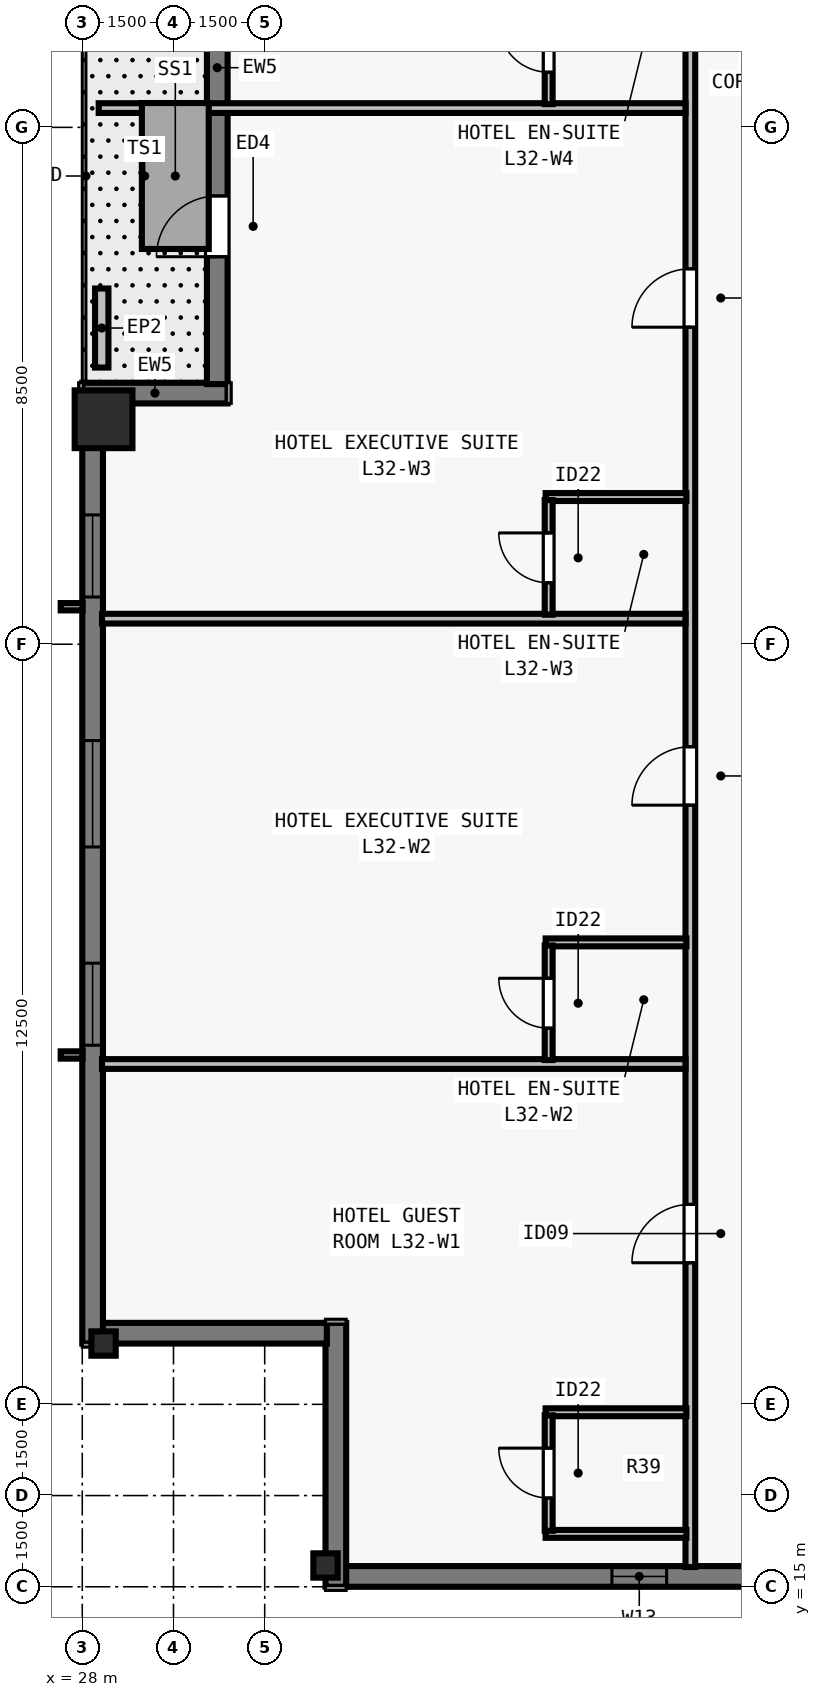
"""IFC4 building model, lengths in metres.
Left out: names, types, materials, properties, quantities, classifications, styles, units other than length and angle.
Written with IfcOpenShell. Run it as: python <this file> out.ifc"""

import sys

from ifc_helpers import new_model, si_unit, direction, frame, frame_2d, origin, origin_2d, place, context, subcontext, project, spatial, rectangle, i_section, extrude, element, fill, save


model = new_model("IFC4")
c1 = context("Model", 3, precision=1e-05, world=origin(), true_north=direction((0.0, 1.0)))
c2 = subcontext(c1, "Body", "Model", "MODEL_VIEW")
j1 = project(units=[si_unit("LENGTHUNIT", "METRE"), si_unit("PLANEANGLEUNIT", "RADIAN")], contexts=[c1])
p1 = place(None, origin())
s1 = spatial("IfcSite", under=j1, at=p1, CompositionType="ELEMENT")
p2 = place(p1, origin())
s2 = spatial("IfcBuilding", under=s1, at=p2, CompositionType="ELEMENT")
p3 = place(p2, frame((0.0, 0.0, 120.0)))
s3 = spatial("IfcBuildingStorey", under=s2, at=p3, CompositionType="ELEMENT", Elevation=120.0)
p4 = place(p3, frame((32.0, 15.35, 0.0), z_axis=(0.0, 0.0, 1.0), x_axis=(1.0, 0.0, 0.0)))
e1 = element("IfcColumn", 1, at=p4, inside=s3, PredefinedType="COLUMN", context=c2, shape_type="SweptSolid", body=[
    extrude(i_section(OverallWidth=0.4, OverallDepth=0.4, WebThickness=0.022, FlangeThickness=0.036, at=origin_2d()), origin(), (0.0, 0.0, 1.0), 3.5),
])
p5 = place(p3, frame((28.35, 34.2, 0.0), z_axis=(0.0, 0.0, 1.0), x_axis=(0.0, 1.0, 0.0)))
e2 = element("IfcColumn", 2, at=p5, inside=s3, PredefinedType="COLUMN", context=c2, shape_type="SweptSolid", body=[
    extrude(rectangle(XDim=0.95, YDim=0.95, at=origin_2d()), origin(), (0.0, 0.0, 1.0), 3.5),
])
p6 = place(p3, frame((28.35, 19.0, 0.0), z_axis=(0.0, 0.0, 1.0), x_axis=(0.0, 1.0, 0.0)))
e3 = element("IfcColumn", 3, at=p6, inside=s3, PredefinedType="COLUMN", context=c2, shape_type="SweptSolid", body=[
    extrude(i_section(OverallWidth=0.4, OverallDepth=0.4, WebThickness=0.022, FlangeThickness=0.036, at=origin_2d()), origin(), (0.0, 0.0, 1.0), 3.5),
])
p7 = place(p3, frame((72.0, 15.17, 0.0), z_axis=(0.0, 0.0, 1.0), x_axis=(-1.0, 0.0, 0.0)))
e4 = element("IfcWall", 4, at=p7, inside=s3, PredefinedType="SOLIDWALL", context=c2, shape_type="SweptSolid", body=[
    extrude(rectangle(XDim=39.682, YDim=0.34, at=frame_2d((19.841, 0.0))), origin(), (0.0, 0.0, 1.0), 3.28),
])
p8 = place(p7, frame((5.802, 0.0, 0.8)))
e5 = element("IfcOpeningElement", 5, at=p8, cuts=e4, PredefinedType="OPENING", context=c2, shape_type="SweptSolid", body=[
    extrude(rectangle(XDim=1.35, YDim=1.66, at=frame_2d((0.675, 0.83))), frame((0.0, 0.18, 0.0), z_axis=(0.0, -1.0, 0.0), x_axis=(1.0, 0.0, 0.0)), (0.0, 0.0, 1.0), 0.36),
])
p9 = place(p7, frame((12.059, 0.0, 0.8)))
e6 = element("IfcOpeningElement", 6, at=p9, cuts=e4, PredefinedType="OPENING", context=c2, shape_type="SweptSolid", body=[
    extrude(rectangle(XDim=1.35, YDim=1.66, at=frame_2d((0.675, 0.83))), frame((0.0, 0.18, 0.0), z_axis=(0.0, -1.0, 0.0), x_axis=(1.0, 0.0, 0.0)), (0.0, 0.0, 1.0), 0.36),
])
p10 = place(p7, frame((19.166, 0.0, 0.8)))
e7 = element("IfcOpeningElement", 7, at=p10, cuts=e4, PredefinedType="OPENING", context=c2, shape_type="SweptSolid", body=[
    extrude(rectangle(XDim=1.35, YDim=1.66, at=frame_2d((0.675, 0.83))), frame((0.0, 0.18, 0.0), z_axis=(0.0, -1.0, 0.0), x_axis=(1.0, 0.0, 0.0)), (0.0, 0.0, 1.0), 0.36),
])
p11 = place(p7, frame((21.27, 0.0, 0.8)))
e8 = element("IfcOpeningElement", 8, at=p11, cuts=e4, PredefinedType="OPENING", context=c2, shape_type="SweptSolid", body=[
    extrude(rectangle(XDim=1.75, YDim=1.66, at=frame_2d((0.875, 0.83))), frame((0.0, 0.18, 0.0), z_axis=(0.0, -1.0, 0.0), x_axis=(1.0, 0.0, 0.0)), (0.0, 0.0, 1.0), 0.36),
])
p12 = place(p7, frame((27.523, 0.0, 0.8)))
e9 = element("IfcOpeningElement", 9, at=p12, cuts=e4, PredefinedType="OPENING", context=c2, shape_type="SweptSolid", body=[
    extrude(rectangle(XDim=1.35, YDim=1.66, at=frame_2d((0.675, 0.83))), frame((0.0, 0.18, 0.0), z_axis=(0.0, -1.0, 0.0), x_axis=(1.0, 0.0, 0.0)), (0.0, 0.0, 1.0), 0.36),
])
p13 = place(p7, frame((29.627, 0.0, 0.8)))
e10 = element("IfcOpeningElement", 10, at=p13, cuts=e4, PredefinedType="OPENING", context=c2, shape_type="SweptSolid", body=[
    extrude(rectangle(XDim=1.75, YDim=1.66, at=frame_2d((0.875, 0.83))), frame((0.0, 0.18, 0.0), z_axis=(0.0, -1.0, 0.0), x_axis=(1.0, 0.0, 0.0)), (0.0, 0.0, 1.0), 0.36),
])
p14 = place(p7, frame((25.43, 0.0, 0.8)))
e11 = element("IfcOpeningElement", 11, at=p14, cuts=e4, PredefinedType="OPENING", context=c2, shape_type="SweptSolid", body=[
    extrude(rectangle(XDim=0.9, YDim=1.66, at=frame_2d((0.45, 0.83))), frame((0.0, 0.18, 0.0), z_axis=(0.0, -1.0, 0.0), x_axis=(1.0, 0.0, 0.0)), (0.0, 0.0, 1.0), 0.36),
])
p15 = place(p7, frame((15.83, 0.0, 0.8)))
e12 = element("IfcOpeningElement", 12, at=p15, cuts=e4, PredefinedType="OPENING", context=c2, shape_type="SweptSolid", body=[
    extrude(rectangle(XDim=0.9, YDim=1.66, at=frame_2d((0.45, 0.83))), frame((0.0, 0.18, 0.0), z_axis=(0.0, -1.0, 0.0), x_axis=(1.0, 0.0, 0.0)), (0.0, 0.0, 1.0), 0.36),
])
p16 = place(p7, frame((34.39, 0.0, 0.8)))
e13 = element("IfcOpeningElement", 13, at=p16, cuts=e4, PredefinedType="OPENING", context=c2, shape_type="SweptSolid", body=[
    extrude(rectangle(XDim=0.9, YDim=1.66, at=frame_2d((0.45, 0.83))), frame((0.0, 0.18, 0.0), z_axis=(0.0, -1.0, 0.0), x_axis=(1.0, 0.0, 0.0)), (0.0, 0.0, 1.0), 0.36),
])
p17 = place(p3, frame((32.17, 15.0, 0.0), z_axis=(0.0, 0.0, 1.0), x_axis=(0.0, 1.0, 0.0)))
e14 = element("IfcWall", 14, at=p17, inside=s3, PredefinedType="SOLIDWALL", context=c2, shape_type="SweptSolid", body=[
    extrude(rectangle(XDim=4.34, YDim=0.34, at=frame_2d((2.17, 0.0))), origin(), (0.0, 0.0, 1.0), 3.28),
])
p18 = place(p3, frame((32.022, 19.17, 0.0), z_axis=(0.0, 0.0, 1.0), x_axis=(-1.0, 0.0, 0.0)))
e15 = element("IfcWall", 15, at=p18, inside=s3, PredefinedType="SOLIDWALL", context=c2, shape_type="SweptSolid", body=[
    extrude(rectangle(XDim=3.704, YDim=0.34, at=frame_2d((1.852, 0.0))), origin(), (0.0, 0.0, 1.0), 3.28),
])
p19 = place(p3, frame((28.17, 19.0, 0.0), z_axis=(0.0, 0.0, 1.0), x_axis=(0.0, 1.0, 0.0)))
e16 = element("IfcWall", 16, at=p19, inside=s3, PredefinedType="SOLIDWALL", context=c2, shape_type="SweptSolid", body=[
    extrude(rectangle(XDim=15.482, YDim=0.34, at=frame_2d((7.741, 0.0))), origin(), (0.0, 0.0, 1.0), 3.28),
])
p20 = place(p19, frame((4.905, 0.0, 0.8)))
e17 = element("IfcOpeningElement", 17, at=p20, cuts=e16, PredefinedType="OPENING", context=c2, shape_type="SweptSolid", body=[
    extrude(rectangle(XDim=1.35, YDim=1.66, at=frame_2d((0.675, 0.83))), frame((0.0, 0.18, 0.0), z_axis=(0.0, -1.0, 0.0), x_axis=(1.0, 0.0, 0.0)), (0.0, 0.0, 1.0), 0.36),
])
p21 = place(p19, frame((8.166, 0.0, 0.8)))
e18 = element("IfcOpeningElement", 18, at=p21, cuts=e16, PredefinedType="OPENING", context=c2, shape_type="SweptSolid", body=[
    extrude(rectangle(XDim=1.75, YDim=1.66, at=frame_2d((0.875, 0.83))), frame((0.0, 0.18, 0.0), z_axis=(0.0, -1.0, 0.0), x_axis=(1.0, 0.0, 0.0)), (0.0, 0.0, 1.0), 0.36),
])
p22 = place(p19, frame((12.277, 0.0, 0.8)))
e19 = element("IfcOpeningElement", 19, at=p22, cuts=e16, PredefinedType="OPENING", context=c2, shape_type="SweptSolid", body=[
    extrude(rectangle(XDim=1.35, YDim=1.66, at=frame_2d((0.675, 0.83))), frame((0.0, 0.18, 0.0), z_axis=(0.0, -1.0, 0.0), x_axis=(1.0, 0.0, 0.0)), (0.0, 0.0, 1.0), 0.36),
])
p23 = place(p3, frame((28.0, 34.63, 0.0), z_axis=(0.0, 0.0, 1.0), x_axis=(1.0, 0.0, 0.0)))
e20 = element("IfcWall", 20, at=p23, inside=s3, PredefinedType="SOLIDWALL", context=c2, shape_type="SweptSolid", body=[
    extrude(rectangle(XDim=2.39, YDim=0.34, at=frame_2d((1.195, 0.0))), origin(), (0.0, 0.0, 1.0), 3.28),
])
p24 = place(p3, frame((30.22, 34.778, 0.0), z_axis=(0.0, 0.0, 1.0), x_axis=(0.0, 1.0, 0.0)))
e21 = element("IfcWall", 21, at=p24, inside=s3, PredefinedType="SOLIDWALL", context=c2, shape_type="SweptSolid", body=[
    extrude(rectangle(XDim=7.162, YDim=0.34, at=frame_2d((3.581, 0.0))), origin(), (0.0, 0.0, 1.0), 3.28),
])
p25 = place(p24, frame((2.094, 0.0, 0.0)))
e22 = element("IfcOpeningElement", 22, at=p25, cuts=e21, PredefinedType="OPENING", context=c2, shape_type="SweptSolid", body=[
    extrude(rectangle(XDim=1.0, YDim=2.15, at=frame_2d((0.5, 1.075))), frame((0.0, 0.18, 0.0), z_axis=(0.0, -1.0, 0.0), x_axis=(1.0, 0.0, 0.0)), (0.0, 0.0, 1.0), 0.36),
])
p26 = place(p3, frame((28.32, 35.05, 0.0), z_axis=(0.0, 0.0, 1.0), x_axis=(0.0, 1.0, 0.0)))
e23 = element("IfcWall", 23, at=p26, inside=s3, PredefinedType="PARAPET", context=c2, shape_type="SweptSolid", body=[
    extrude(rectangle(XDim=1.3, YDim=0.22, at=frame_2d((0.65, 0.0))), origin(), (0.0, 0.0, 1.0), 0.55),
])
p27 = place(p3, frame((38.0, 15.325, 0.0), z_axis=(0.0, 0.0, 1.0), x_axis=(0.0, 1.0, 0.0)))
e24 = element("IfcWall", 24, at=p27, inside=s3, PredefinedType="PARTITIONING", context=c2, shape_type="SweptSolid", body=[
    extrude(rectangle(XDim=47.35, YDim=0.16, at=frame_2d((23.675, 0.0))), origin(), (0.0, 0.0, 1.0), 2.555),
])
p28 = place(p27, frame((5.003, 0.0, 0.0)))
e25 = element("IfcOpeningElement", 25, at=p28, cuts=e24, PredefinedType="OPENING", context=c2, shape_type="SweptSolid", body=[
    extrude(rectangle(XDim=0.96, YDim=2.15, at=frame_2d((0.48, 1.075))), frame((0.0, 0.09, 0.0), z_axis=(0.0, -1.0, 0.0), x_axis=(1.0, 0.0, 0.0)), (0.0, 0.0, 1.0), 0.18),
])
p29 = place(p27, frame((12.529, 0.0, 0.0)))
e26 = element("IfcOpeningElement", 26, at=p29, cuts=e24, PredefinedType="OPENING", context=c2, shape_type="SweptSolid", body=[
    extrude(rectangle(XDim=0.96, YDim=2.15, at=frame_2d((0.48, 1.075))), frame((0.0, 0.09, 0.0), z_axis=(0.0, -1.0, 0.0), x_axis=(1.0, 0.0, 0.0)), (0.0, 0.0, 1.0), 0.18),
])
p30 = place(p27, frame((20.389, 0.0, 0.0)))
e27 = element("IfcOpeningElement", 27, at=p30, cuts=e24, PredefinedType="OPENING", context=c2, shape_type="SweptSolid", body=[
    extrude(rectangle(XDim=0.96, YDim=2.15, at=frame_2d((0.48, 1.075))), frame((0.0, 0.09, 0.0), z_axis=(0.0, -1.0, 0.0), x_axis=(1.0, 0.0, 0.0)), (0.0, 0.0, 1.0), 0.18),
])
p31 = place(p27, frame((28.249, 0.0, 0.0)))
e28 = element("IfcOpeningElement", 28, at=p31, cuts=e24, PredefinedType="OPENING", context=c2, shape_type="SweptSolid", body=[
    extrude(rectangle(XDim=0.96, YDim=2.15, at=frame_2d((0.48, 1.075))), frame((0.0, 0.09, 0.0), z_axis=(0.0, -1.0, 0.0), x_axis=(1.0, 0.0, 0.0)), (0.0, 0.0, 1.0), 0.18),
])
p32 = place(p27, frame((36.109, 0.0, 0.0)))
e29 = element("IfcOpeningElement", 29, at=p32, cuts=e24, PredefinedType="OPENING", context=c2, shape_type="SweptSolid", body=[
    extrude(rectangle(XDim=0.96, YDim=2.15, at=frame_2d((0.48, 1.075))), frame((0.0, 0.09, 0.0), z_axis=(0.0, -1.0, 0.0), x_axis=(1.0, 0.0, 0.0)), (0.0, 0.0, 1.0), 0.18),
])
p33 = place(p27, frame((44.079, 0.0, 0.0)))
e30 = element("IfcOpeningElement", 30, at=p33, cuts=e24, PredefinedType="OPENING", context=c2, shape_type="SweptSolid", body=[
    extrude(rectangle(XDim=0.96, YDim=2.15, at=frame_2d((0.48, 1.075))), frame((0.0, 0.09, 0.0), z_axis=(0.0, -1.0, 0.0), x_axis=(1.0, 0.0, 0.0)), (0.0, 0.0, 1.0), 0.18),
])
for number, where, z_axis, x_axis in (
    (31, (35.62, 15.87, 0.0), (0.0, 0.0, 1.0), (1.0, 0.0, 0.0)),
    (32, (35.62, 17.87, 0.0), (0.0, 0.0, 1.0), (1.0, 0.0, 0.0)),
):
    element("IfcWall", number, at=place(p3, frame(where, z_axis=z_axis, x_axis=x_axis)), inside=s3, PredefinedType="PLUMBINGWALL", context=c2, shape_type="SweptSolid", body=[
        extrude(rectangle(XDim=2.315, YDim=0.13, at=frame_2d((1.157, 0.0))), origin(), (0.0, 0.0, 1.0), 3.28),
    ])
p34 = place(p3, frame((35.67, 15.92, 0.0), z_axis=(0.0, 0.0, 1.0), x_axis=(0.0, 1.0, 0.0)))
e33 = element("IfcWall", 33, at=p34, inside=s3, PredefinedType="PLUMBINGWALL", context=c2, shape_type="SweptSolid", body=[
    extrude(rectangle(XDim=1.9, YDim=0.13, at=frame_2d((0.95, 0.0))), origin(), (0.0, 0.0, 1.0), 3.28),
])
p35 = place(p34, frame((0.54, 0.0, 0.0)))
e34 = element("IfcOpeningElement", 34, at=p35, cuts=e33, PredefinedType="OPENING", context=c2, shape_type="SweptSolid", body=[
    extrude(rectangle(XDim=0.82, YDim=2.1, at=frame_2d((0.41, 1.05))), frame((0.0, 0.075, 0.0), z_axis=(0.0, -1.0, 0.0), x_axis=(1.0, 0.0, 0.0)), (0.0, 0.0, 1.0), 0.15),
])
p36 = place(p3, frame((28.325, 23.597, 0.0), z_axis=(0.0, 0.0, 1.0), x_axis=(1.0, 0.0, 0.0)))
e35 = element("IfcWall", 35, at=p36, inside=s3, PredefinedType="PARTITIONING", context=c2, shape_type="SweptSolid", body=[
    extrude(rectangle(XDim=9.595, YDim=0.16, at=frame_2d((4.797, 0.0))), origin(), (0.0, 0.0, 1.0), 2.896),
])
p37 = place(p3, frame((35.62, 25.597, 0.0), z_axis=(0.0, 0.0, 1.0), x_axis=(1.0, 0.0, 0.0)))
e36 = element("IfcWall", 36, at=p37, inside=s3, PredefinedType="PLUMBINGWALL", context=c2, shape_type="SweptSolid", body=[
    extrude(rectangle(XDim=2.315, YDim=0.13, at=frame_2d((1.157, 0.0))), origin(), (0.0, 0.0, 1.0), 2.896),
])
p38 = place(p3, frame((35.67, 23.662, 0.0), z_axis=(0.0, 0.0, 1.0), x_axis=(0.0, 1.0, 0.0)))
e37 = element("IfcWall", 37, at=p38, inside=s3, PredefinedType="PLUMBINGWALL", context=c2, shape_type="SweptSolid", body=[
    extrude(rectangle(XDim=1.885, YDim=0.13, at=frame_2d((0.942, 0.0))), origin(), (0.0, 0.0, 1.0), 3.28),
])
p39 = place(p38, frame((0.525, 0.0, 0.0)))
e38 = element("IfcOpeningElement", 38, at=p39, cuts=e37, PredefinedType="OPENING", context=c2, shape_type="SweptSolid", body=[
    extrude(rectangle(XDim=0.82, YDim=2.1, at=frame_2d((0.41, 1.05))), frame((0.0, 0.075, 0.0), z_axis=(0.0, -1.0, 0.0), x_axis=(1.0, 0.0, 0.0)), (0.0, 0.0, 1.0), 0.15),
])
p40 = place(p3, frame((28.325, 30.921, 0.0), z_axis=(0.0, 0.0, 1.0), x_axis=(1.0, 0.0, 0.0)))
e39 = element("IfcWall", 39, at=p40, inside=s3, PredefinedType="PARTITIONING", context=c2, shape_type="SweptSolid", body=[
    extrude(rectangle(XDim=9.595, YDim=0.16, at=frame_2d((4.797, 0.0))), origin(), (0.0, 0.0, 1.0), 3.28),
])
p41 = place(p3, frame((35.62, 32.921, 0.0), z_axis=(0.0, 0.0, 1.0), x_axis=(1.0, 0.0, 0.0)))
e40 = element("IfcWall", 40, at=p41, inside=s3, PredefinedType="PLUMBINGWALL", context=c2, shape_type="SweptSolid", body=[
    extrude(rectangle(XDim=2.315, YDim=0.13, at=frame_2d((1.157, 0.0))), origin(), (0.0, 0.0, 1.0), 3.28),
])
p42 = place(p3, frame((35.67, 30.986, 0.0), z_axis=(0.0, 0.0, 1.0), x_axis=(0.0, 1.0, 0.0)))
e41 = element("IfcWall", 41, at=p42, inside=s3, PredefinedType="PLUMBINGWALL", context=c2, shape_type="SweptSolid", body=[
    extrude(rectangle(XDim=1.885, YDim=0.13, at=frame_2d((0.942, 0.0))), origin(), (0.0, 0.0, 1.0), 3.28),
])
p43 = place(p42, frame((0.525, 0.0, 0.0)))
e42 = element("IfcOpeningElement", 42, at=p43, cuts=e41, PredefinedType="OPENING", context=c2, shape_type="SweptSolid", body=[
    extrude(rectangle(XDim=0.82, YDim=2.1, at=frame_2d((0.41, 1.05))), frame((0.0, 0.075, 0.0), z_axis=(0.0, -1.0, 0.0), x_axis=(1.0, 0.0, 0.0)), (0.0, 0.0, 1.0), 0.15),
])
p44 = place(p3, frame((28.27, 39.317, 0.0), z_axis=(0.0, 0.0, 1.0), x_axis=(1.0, 0.0, 0.0)))
e43 = element("IfcWall", 43, at=p44, inside=s3, PredefinedType="PARTITIONING", context=c2, shape_type="SweptSolid", body=[
    extrude(rectangle(XDim=9.65, YDim=0.16, at=frame_2d((4.825, 0.0))), origin(), (0.0, 0.0, 1.0), 2.896),
])
p45 = place(p3, frame((35.67, 39.382, 0.0), z_axis=(0.0, 0.0, 1.0), x_axis=(0.0, 1.0, 0.0)))
e44 = element("IfcWall", 44, at=p45, inside=s3, PredefinedType="PLUMBINGWALL", context=c2, shape_type="SweptSolid", body=[
    extrude(rectangle(XDim=1.885, YDim=0.13, at=frame_2d((0.942, 0.0))), origin(), (0.0, 0.0, 1.0), 3.28),
])
p46 = place(p45, frame((0.525, 0.0, 0.0)))
e45 = element("IfcOpeningElement", 45, at=p46, cuts=e44, PredefinedType="OPENING", context=c2, shape_type="SweptSolid", body=[
    extrude(rectangle(XDim=0.82, YDim=2.1, at=frame_2d((0.41, 1.05))), frame((0.0, 0.075, 0.0), z_axis=(0.0, -1.0, 0.0), x_axis=(1.0, 0.0, 0.0)), (0.0, 0.0, 1.0), 0.15),
])
p47 = place(p20, origin())
e46 = element("IfcWindow", 46, at=p47, inside=s3, PartitioningType="SINGLE_PANEL", PredefinedType="WINDOW", context=c2, shape_type="SweptSolid", body=[
    extrude(rectangle(XDim=1.35, YDim=1.66, at=frame_2d((0.675, 0.83))), frame((0.0, -0.05, 0.0), z_axis=(0.0, -1.0, 0.0), x_axis=(1.0, 0.0, 0.0)), (0.0, 0.0, 1.0), 0.06),
])
fill(e17, e46)
p48 = place(p21, origin())
e47 = element("IfcWindow", 47, at=p48, inside=s3, PartitioningType="SINGLE_PANEL", PredefinedType="WINDOW", context=c2, shape_type="SweptSolid", body=[
    extrude(rectangle(XDim=1.75, YDim=1.66, at=frame_2d((0.875, 0.83))), frame((0.0, -0.05, 0.0), z_axis=(0.0, -1.0, 0.0), x_axis=(1.0, 0.0, 0.0)), (0.0, 0.0, 1.0), 0.06),
])
fill(e18, e47)
p49 = place(p22, origin())
e48 = element("IfcWindow", 48, at=p49, inside=s3, PartitioningType="SINGLE_PANEL", PredefinedType="WINDOW", context=c2, shape_type="SweptSolid", body=[
    extrude(rectangle(XDim=1.35, YDim=1.66, at=frame_2d((0.675, 0.83))), frame((0.0, -0.05, 0.0), z_axis=(0.0, -1.0, 0.0), x_axis=(1.0, 0.0, 0.0)), (0.0, 0.0, 1.0), 0.06),
])
fill(e19, e48)
p50 = place(p25, origin())
e49 = element("IfcDoor", 49, at=p50, inside=s3, OperationType="SINGLE_SWING_LEFT", PredefinedType="DOOR", context=c2, shape_type="SweptSolid", body=[
    extrude(rectangle(XDim=1.0, YDim=2.15, at=frame_2d((0.5, 1.075))), frame((0.0, 0.025, 0.0), z_axis=(0.0, -1.0, 0.0), x_axis=(1.0, 0.0, 0.0)), (0.0, 0.0, 1.0), 0.05),
])
fill(e22, e49)
p51 = place(p16, origin())
e50 = element("IfcWindow", 50, at=p51, inside=s3, PartitioningType="SINGLE_PANEL", PredefinedType="WINDOW", context=c2, shape_type="SweptSolid", body=[
    extrude(rectangle(XDim=0.9, YDim=1.66, at=frame_2d((0.45, 0.83))), frame((0.0, -0.04, 0.0), z_axis=(0.0, -1.0, 0.0), x_axis=(1.0, 0.0, 0.0)), (0.0, 0.0, 1.0), 0.06),
])
fill(e13, e50)
p52 = place(p35, origin())
e51 = element("IfcDoor", 51, at=p52, inside=s3, OperationType="SINGLE_SWING_RIGHT", PredefinedType="DOOR", context=c2, shape_type="SweptSolid", body=[
    extrude(rectangle(XDim=0.82, YDim=2.1, at=frame_2d((0.41, 1.05))), frame((0.0, 0.025, 0.0), z_axis=(0.0, -1.0, 0.0), x_axis=(1.0, 0.0, 0.0)), (0.0, 0.0, 1.0), 0.05),
])
fill(e34, e51)
p53 = place(p28, origin())
e52 = element("IfcDoor", 52, at=p53, inside=s3, OperationType="SINGLE_SWING_LEFT", PredefinedType="DOOR", context=c2, shape_type="SweptSolid", body=[
    extrude(rectangle(XDim=0.96, YDim=2.15, at=frame_2d((0.48, 1.075))), frame((0.0, 0.025, 0.0), z_axis=(0.0, -1.0, 0.0), x_axis=(1.0, 0.0, 0.0)), (0.0, 0.0, 1.0), 0.05),
])
fill(e25, e52)
p54 = place(p39, origin())
e53 = element("IfcDoor", 53, at=p54, inside=s3, OperationType="SINGLE_SWING_RIGHT", PredefinedType="DOOR", context=c2, shape_type="SweptSolid", body=[
    extrude(rectangle(XDim=0.82, YDim=2.1, at=frame_2d((0.41, 1.05))), frame((0.0, 0.025, 0.0), z_axis=(0.0, -1.0, 0.0), x_axis=(1.0, 0.0, 0.0)), (0.0, 0.0, 1.0), 0.05),
])
fill(e38, e53)
p55 = place(p29, origin())
e54 = element("IfcDoor", 54, at=p55, inside=s3, OperationType="SINGLE_SWING_LEFT", PredefinedType="DOOR", context=c2, shape_type="SweptSolid", body=[
    extrude(rectangle(XDim=0.96, YDim=2.15, at=frame_2d((0.48, 1.075))), frame((0.0, 0.025, 0.0), z_axis=(0.0, -1.0, 0.0), x_axis=(1.0, 0.0, 0.0)), (0.0, 0.0, 1.0), 0.05),
])
fill(e26, e54)
p56 = place(p43, origin())
e55 = element("IfcDoor", 55, at=p56, inside=s3, OperationType="SINGLE_SWING_RIGHT", PredefinedType="DOOR", context=c2, shape_type="SweptSolid", body=[
    extrude(rectangle(XDim=0.82, YDim=2.1, at=frame_2d((0.41, 1.05))), frame((0.0, 0.025, 0.0), z_axis=(0.0, -1.0, 0.0), x_axis=(1.0, 0.0, 0.0)), (0.0, 0.0, 1.0), 0.05),
])
fill(e42, e55)
p57 = place(p30, origin())
e56 = element("IfcDoor", 56, at=p57, inside=s3, OperationType="SINGLE_SWING_LEFT", PredefinedType="DOOR", context=c2, shape_type="SweptSolid", body=[
    extrude(rectangle(XDim=0.96, YDim=2.15, at=frame_2d((0.48, 1.075))), frame((0.0, 0.025, 0.0), z_axis=(0.0, -1.0, 0.0), x_axis=(1.0, 0.0, 0.0)), (0.0, 0.0, 1.0), 0.05),
])
fill(e27, e56)
p58 = place(p46, origin())
e57 = element("IfcDoor", 57, at=p58, inside=s3, OperationType="SINGLE_SWING_RIGHT", PredefinedType="DOOR", context=c2, shape_type="SweptSolid", body=[
    extrude(rectangle(XDim=0.82, YDim=2.1, at=frame_2d((0.41, 1.05))), frame((0.0, 0.025, 0.0), z_axis=(0.0, -1.0, 0.0), x_axis=(1.0, 0.0, 0.0)), (0.0, 0.0, 1.0), 0.05),
])
fill(e45, e57)
save(model, sys.argv[1])
